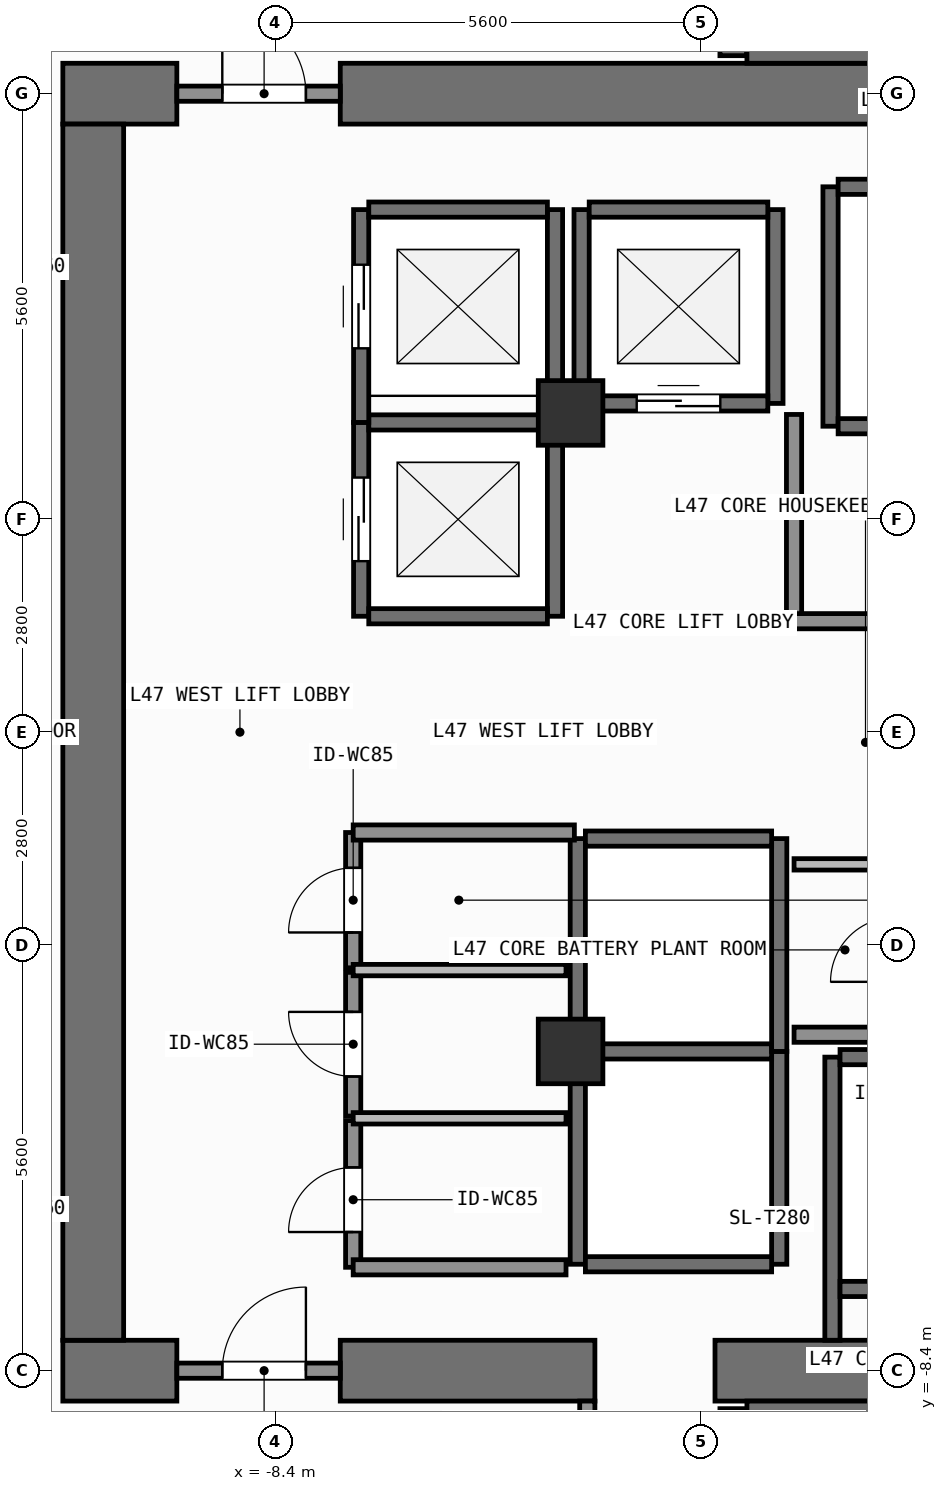
"""IFC4 building model, lengths in metres.
Left out: names, types, materials, properties, quantities, classifications, styles, units other than length and angle.
Written with IfcOpenShell. Run it as: python <this file> out.ifc"""

import sys

from ifc_helpers import new_model, si_unit, direction, frame, frame_2d, origin, origin_2d, place, context, subcontext, project, spatial, rectangle, extrude, element, fill, save


model = new_model("IFC4")
c1 = context("Model", 3, precision=1e-05, world=origin(), true_north=direction((0.0, 1.0)))
c2 = subcontext(c1, "Body", "Model", "MODEL_VIEW")
j1 = project(units=[si_unit("LENGTHUNIT", "METRE"), si_unit("PLANEANGLEUNIT", "RADIAN")], contexts=[c1])
p1 = place(None, origin())
s1 = spatial("IfcSite", under=j1, at=p1, CompositionType="ELEMENT")
p2 = place(p1, origin())
s2 = spatial("IfcBuilding", under=s1, at=p2, CompositionType="ELEMENT")
p3 = place(p2, frame((0.0, 0.0, 191.4)))
s3 = spatial("IfcBuildingStorey", under=s2, at=p3, CompositionType="ELEMENT", Elevation=191.4)
p4 = place(p3, frame((-11.2, -8.4, 0.0), z_axis=(0.0, 0.0, 1.0), x_axis=(1.0, 0.0, 0.0)))
e1 = element("IfcWall", 1, at=p4, inside=s3, PredefinedType="SHEAR", context=c2, shape_type="SweptSolid", body=[
    extrude(rectangle(XDim=1.5, YDim=0.8, at=frame_2d((0.75, 0.0))), origin(), (0.0, 0.0, 1.0), 3.9),
])
p5 = place(p3, frame((-7.55, -8.4, 0.0), z_axis=(0.0, 0.0, 1.0), x_axis=(1.0, 0.0, 0.0)))
e2 = element("IfcWall", 2, at=p5, inside=s3, PredefinedType="SHEAR", context=c2, shape_type="SweptSolid", body=[
    extrude(rectangle(XDim=3.35, YDim=0.8, at=frame_2d((1.675, 0.0))), origin(), (0.0, 0.0, 1.0), 3.9),
])
p6 = place(p3, frame((-2.62, -8.4, 0.0), z_axis=(0.0, 0.0, 1.0), x_axis=(1.0, 0.0, 0.0)))
e3 = element("IfcWall", 3, at=p6, inside=s3, PredefinedType="SHEAR", context=c2, shape_type="SweptSolid", body=[
    extrude(rectangle(XDim=7.27, YDim=0.8, at=frame_2d((3.635, 0.0))), origin(), (0.0, 0.0, 1.0), 3.9),
])
p7 = place(p3, frame((-11.2, 8.4, 0.0), z_axis=(0.0, 0.0, 1.0), x_axis=(1.0, 0.0, 0.0)))
e4 = element("IfcWall", 4, at=p7, inside=s3, PredefinedType="SHEAR", context=c2, shape_type="SweptSolid", body=[
    extrude(rectangle(XDim=1.5, YDim=0.8, at=frame_2d((0.75, 0.0))), origin(), (0.0, 0.0, 1.0), 3.9),
])
p8 = place(p3, frame((-7.55, 8.4, 0.0), z_axis=(0.0, 0.0, 1.0), x_axis=(1.0, 0.0, 0.0)))
e5 = element("IfcWall", 5, at=p8, inside=s3, PredefinedType="SHEAR", context=c2, shape_type="SweptSolid", body=[
    extrude(rectangle(XDim=16.35, YDim=0.8, at=frame_2d((8.175, 0.0))), origin(), (0.0, 0.0, 1.0), 3.9),
])
p9 = place(p3, frame((-10.8, -8.0, 0.0), z_axis=(0.0, 0.0, 1.0), x_axis=(0.0, 1.0, 0.0)))
e6 = element("IfcWall", 6, at=p9, inside=s3, PredefinedType="SHEAR", context=c2, shape_type="SweptSolid", body=[
    extrude(rectangle(XDim=16.0, YDim=0.8, at=frame_2d((8.0, 0.0))), origin(), (0.0, 0.0, 1.0), 3.9),
])
p10 = place(p3, frame((-2.2, -8.913, 0.0), z_axis=(0.0, 0.0, 1.0), x_axis=(1.0, 0.0, 0.0)))
e7 = element("IfcWall", 7, at=p10, inside=s3, PredefinedType="SHEAR", context=c2, shape_type="SweptSolid", body=[
    extrude(rectangle(XDim=6.6, YDim=0.225, at=frame_2d((3.3, 0.0))), origin(), (0.0, 0.0, 1.0), 3.9),
])
p11 = place(p3, frame((-2.38, -11.825, 0.0), z_axis=(0.0, 0.0, 1.0), x_axis=(0.0, 1.0, 0.0)))
e8 = element("IfcWall", 8, at=p11, inside=s3, PredefinedType="SHEAR", context=c2, shape_type="SweptSolid", body=[
    extrude(rectangle(XDim=2.925, YDim=0.35, at=frame_2d((1.462, 0.0))), origin(), (0.0, 0.0, 1.0), 3.9),
])
p12 = place(p3, frame((-2.2, 8.913, 0.0), z_axis=(0.0, 0.0, 1.0), x_axis=(1.0, 0.0, 0.0)))
e9 = element("IfcWall", 9, at=p12, inside=s3, PredefinedType="SHEAR", context=c2, shape_type="SweptSolid", body=[
    extrude(rectangle(XDim=6.6, YDim=0.225, at=frame_2d((3.3, 0.0))), origin(), (0.0, 0.0, 1.0), 3.9),
])
p13 = place(p3, frame((-2.38, 8.9, 0.0), z_axis=(0.0, 0.0, 1.0), x_axis=(0.0, 1.0, 0.0)))
e10 = element("IfcWall", 10, at=p13, inside=s3, PredefinedType="SHEAR", context=c2, shape_type="SweptSolid", body=[
    extrude(rectangle(XDim=2.925, YDim=0.35, at=frame_2d((1.462, 0.0))), origin(), (0.0, 0.0, 1.0), 3.9),
])
for number, where, z_axis, x_axis in (
    (11, (-4.52, -4.2, 0.0), (0.0, 0.0, 1.0), (1.0, 0.0, 0.0)),
    (12, (-4.52, 4.2, 0.0), (0.0, 0.0, 1.0), (1.0, 0.0, 0.0)),
):
    element("IfcColumn", number, at=place(p3, frame(where, z_axis=z_axis, x_axis=x_axis)), inside=s3, PredefinedType="COLUMN", context=c2, shape_type="SweptSolid", body=[
        extrude(rectangle(XDim=0.85, YDim=0.85, at=origin_2d()), origin(), (0.0, 0.0, 1.0), 3.9),
    ])
p14 = place(p3, frame((-7.275, 1.525, 0.0), z_axis=(0.0, 0.0, 1.0), x_axis=(0.0, 1.0, 0.0)))
e13 = element("IfcWall", 13, at=p14, inside=s3, PredefinedType="SHEAR", context=c2, shape_type="SweptSolid", body=[
    extrude(rectangle(XDim=2.55, YDim=0.2, at=frame_2d((1.275, 0.0))), origin(), (0.0, 0.0, 1.0), 3.68),
])
p15 = place(p14, frame((0.725, 0.0, 0.0)))
e14 = element("IfcOpeningElement", 14, at=p15, cuts=e13, PredefinedType="OPENING", context=c2, shape_type="SweptSolid", body=[
    extrude(rectangle(XDim=1.1, YDim=2.2, at=frame_2d((0.55, 1.1))), frame((0.0, 0.11, 0.0), z_axis=(0.0, -1.0, 0.0), x_axis=(1.0, 0.0, 0.0)), (0.0, 0.0, 1.0), 0.22),
])
p16 = place(p3, frame((-4.725, 1.525, 0.0), z_axis=(0.0, 0.0, 1.0), x_axis=(0.0, 1.0, 0.0)))
e15 = element("IfcWall", 15, at=p16, inside=s3, PredefinedType="SHEAR", context=c2, shape_type="SweptSolid", body=[
    extrude(rectangle(XDim=2.55, YDim=0.2, at=frame_2d((1.275, 0.0))), origin(), (0.0, 0.0, 1.0), 3.68),
])
for number, where, z_axis, x_axis in (
    (16, (-7.175, 1.525, 0.0), (0.0, 0.0, 1.0), (1.0, 0.0, 0.0)),
    (17, (-7.175, 4.075, 0.0), (0.0, 0.0, 1.0), (1.0, 0.0, 0.0)),
):
    element("IfcWall", number, at=place(p3, frame(where, z_axis=z_axis, x_axis=x_axis)), inside=s3, PredefinedType="SHEAR", context=c2, shape_type="SweptSolid", body=[
        extrude(rectangle(XDim=2.35, YDim=0.2, at=frame_2d((1.175, 0.0))), origin(), (0.0, 0.0, 1.0), 3.68),
    ])
p17 = place(p3, frame((-7.275, 4.075, 0.0), z_axis=(0.0, 0.0, 1.0), x_axis=(0.0, 1.0, 0.0)))
e18 = element("IfcWall", 18, at=p17, inside=s3, PredefinedType="SHEAR", context=c2, shape_type="SweptSolid", body=[
    extrude(rectangle(XDim=2.8, YDim=0.2, at=frame_2d((1.4, 0.0))), origin(), (0.0, 0.0, 1.0), 3.68),
])
p18 = place(p17, frame((0.975, 0.0, 0.0)))
e19 = element("IfcOpeningElement", 19, at=p18, cuts=e18, PredefinedType="OPENING", context=c2, shape_type="SweptSolid", body=[
    extrude(rectangle(XDim=1.1, YDim=2.2, at=frame_2d((0.55, 1.1))), frame((0.0, 0.11, 0.0), z_axis=(0.0, -1.0, 0.0), x_axis=(1.0, 0.0, 0.0)), (0.0, 0.0, 1.0), 0.22),
])
p19 = place(p3, frame((-4.725, 4.075, 0.0), z_axis=(0.0, 0.0, 1.0), x_axis=(0.0, 1.0, 0.0)))
e20 = element("IfcWall", 20, at=p19, inside=s3, PredefinedType="SHEAR", context=c2, shape_type="SweptSolid", body=[
    extrude(rectangle(XDim=2.8, YDim=0.2, at=frame_2d((1.4, 0.0))), origin(), (0.0, 0.0, 1.0), 3.68),
])
p20 = place(p3, frame((-7.175, 6.875, 0.0), z_axis=(0.0, 0.0, 1.0), x_axis=(1.0, 0.0, 0.0)))
e21 = element("IfcWall", 21, at=p20, inside=s3, PredefinedType="SHEAR", context=c2, shape_type="SweptSolid", body=[
    extrude(rectangle(XDim=2.35, YDim=0.2, at=frame_2d((1.175, 0.0))), origin(), (0.0, 0.0, 1.0), 3.68),
])
for number, where, z_axis, x_axis in (
    (22, (-4.375, 4.325, 0.0), (0.0, 0.0, 1.0), (0.0, 1.0, 0.0)),
    (23, (-1.825, 4.325, 0.0), (0.0, 0.0, 1.0), (0.0, 1.0, 0.0)),
):
    element("IfcWall", number, at=place(p3, frame(where, z_axis=z_axis, x_axis=x_axis)), inside=s3, PredefinedType="SHEAR", context=c2, shape_type="SweptSolid", body=[
        extrude(rectangle(XDim=2.55, YDim=0.2, at=frame_2d((1.275, 0.0))), origin(), (0.0, 0.0, 1.0), 3.68),
    ])
p21 = place(p3, frame((-4.275, 4.325, 0.0), z_axis=(0.0, 0.0, 1.0), x_axis=(1.0, 0.0, 0.0)))
e24 = element("IfcWall", 24, at=p21, inside=s3, PredefinedType="SHEAR", context=c2, shape_type="SweptSolid", body=[
    extrude(rectangle(XDim=2.35, YDim=0.2, at=frame_2d((1.175, 0.0))), origin(), (0.0, 0.0, 1.0), 3.68),
])
p22 = place(p21, frame((0.625, 0.0, 0.0)))
e25 = element("IfcOpeningElement", 25, at=p22, cuts=e24, PredefinedType="OPENING", context=c2, shape_type="SweptSolid", body=[
    extrude(rectangle(XDim=1.1, YDim=2.2, at=frame_2d((0.55, 1.1))), frame((0.0, 0.11, 0.0), z_axis=(0.0, -1.0, 0.0), x_axis=(1.0, 0.0, 0.0)), (0.0, 0.0, 1.0), 0.22),
])
p23 = place(p3, frame((-4.275, 6.875, 0.0), z_axis=(0.0, 0.0, 1.0), x_axis=(1.0, 0.0, 0.0)))
e26 = element("IfcWall", 26, at=p23, inside=s3, PredefinedType="SHEAR", context=c2, shape_type="SweptSolid", body=[
    extrude(rectangle(XDim=2.35, YDim=0.2, at=frame_2d((1.175, 0.0))), origin(), (0.0, 0.0, 1.0), 3.68),
])
for number, where, z_axis, x_axis in (
    (27, (-4.425, -7.0, 0.0), (0.0, 0.0, 1.0), (0.0, 1.0, 0.0)),
    (28, (-1.775, -7.0, 0.0), (0.0, 0.0, 1.0), (0.0, 1.0, 0.0)),
):
    element("IfcWall", number, at=place(p3, frame(where, z_axis=z_axis, x_axis=x_axis)), inside=s3, PredefinedType="SHEAR", context=c2, shape_type="SweptSolid", body=[
        extrude(rectangle(XDim=2.8, YDim=0.2, at=frame_2d((1.4, 0.0))), origin(), (0.0, 0.0, 1.0), 3.68),
    ])
for number, where, z_axis, x_axis in (
    (29, (-4.325, -7.0, 0.0), (0.0, 0.0, 1.0), (1.0, 0.0, 0.0)),
    (30, (-4.325, -4.2, 0.0), (0.0, 0.0, 1.0), (1.0, 0.0, 0.0)),
):
    element("IfcWall", number, at=place(p3, frame(where, z_axis=z_axis, x_axis=x_axis)), inside=s3, PredefinedType="SHEAR", context=c2, shape_type="SweptSolid", body=[
        extrude(rectangle(XDim=2.45, YDim=0.2, at=frame_2d((1.225, 0.0))), origin(), (0.0, 0.0, 1.0), 3.68),
    ])
for number, where, z_axis, x_axis in (
    (31, (-4.425, -4.2, 0.0), (0.0, 0.0, 1.0), (0.0, 1.0, 0.0)),
    (32, (-1.775, -4.2, 0.0), (0.0, 0.0, 1.0), (0.0, 1.0, 0.0)),
):
    element("IfcWall", number, at=place(p3, frame(where, z_axis=z_axis, x_axis=x_axis)), inside=s3, PredefinedType="SHEAR", context=c2, shape_type="SweptSolid", body=[
        extrude(rectangle(XDim=2.8, YDim=0.2, at=frame_2d((1.4, 0.0))), origin(), (0.0, 0.0, 1.0), 3.68),
    ])
p24 = place(p3, frame((-4.325, -1.4, 0.0), z_axis=(0.0, 0.0, 1.0), x_axis=(1.0, 0.0, 0.0)))
e33 = element("IfcWall", 33, at=p24, inside=s3, PredefinedType="SHEAR", context=c2, shape_type="SweptSolid", body=[
    extrude(rectangle(XDim=2.45, YDim=0.2, at=frame_2d((1.225, 0.0))), origin(), (0.0, 0.0, 1.0), 3.68),
])
p25 = place(p3, frame((-1.1, 4.025, 0.0), z_axis=(0.0, 0.0, 1.0), x_axis=(0.0, 1.0, 0.0)))
e34 = element("IfcWall", 34, at=p25, inside=s3, PredefinedType="SHEAR", context=c2, shape_type="SweptSolid", body=[
    extrude(rectangle(XDim=3.15, YDim=0.2, at=frame_2d((1.575, 0.0))), origin(), (0.0, 0.0, 1.0), 3.68),
])
for number, where, z_axis, x_axis in (
    (35, (-1.0, 4.025, 0.0), (0.0, 0.0, 1.0), (1.0, 0.0, 0.0)),
    (36, (-1.0, 7.175, 0.0), (0.0, 0.0, 1.0), (1.0, 0.0, 0.0)),
):
    element("IfcWall", number, at=place(p3, frame(where, z_axis=z_axis, x_axis=x_axis)), inside=s3, PredefinedType="SHEAR", context=c2, shape_type="SweptSolid", body=[
        extrude(rectangle(XDim=2.4, YDim=0.2, at=frame_2d((1.2, 0.0))), origin(), (0.0, 0.0, 1.0), 3.68),
    ])
p26 = place(p3, frame((-1.075, -8.0, 0.0), z_axis=(0.0, 0.0, 1.0), x_axis=(0.0, 1.0, 0.0)))
e37 = element("IfcWall", 37, at=p26, inside=s3, PredefinedType="SHEAR", context=c2, shape_type="SweptSolid", body=[
    extrude(rectangle(XDim=3.725, YDim=0.2, at=frame_2d((1.863, 0.0))), origin(), (0.0, 0.0, 1.0), 3.68),
])
for number, where, z_axis, x_axis in (
    (38, (-0.975, -7.325, 0.0), (0.0, 0.0, 1.0), (1.0, 0.0, 0.0)),
    (39, (-0.975, -4.275, 0.0), (0.0, 0.0, 1.0), (1.0, 0.0, 0.0)),
):
    element("IfcWall", number, at=place(p3, frame(where, z_axis=z_axis, x_axis=x_axis)), inside=s3, PredefinedType="SHEAR", context=c2, shape_type="SweptSolid", body=[
        extrude(rectangle(XDim=2.35, YDim=0.2, at=frame_2d((1.175, 0.0))), origin(), (0.0, 0.0, 1.0), 3.68),
    ])
p27 = place(p3, frame((-9.7, -8.4, 0.0), z_axis=(0.0, 0.0, 1.0), x_axis=(1.0, 0.0, 0.0)))
e40 = element("IfcWall", 40, at=p27, inside=s3, PredefinedType="SOLIDWALL", context=c2, shape_type="SweptSolid", body=[
    extrude(rectangle(XDim=2.15, YDim=0.2, at=frame_2d((1.075, 0.0))), origin(), (0.0, 0.0, 1.0), 2.82),
])
p28 = place(p27, frame((0.598, 0.0, 0.0)))
e41 = element("IfcOpeningElement", 41, at=p28, cuts=e40, PredefinedType="OPENING", context=c2, shape_type="SweptSolid", body=[
    extrude(rectangle(XDim=1.1, YDim=2.15, at=frame_2d((0.55, 1.075))), frame((0.0, 0.11, 0.0), z_axis=(0.0, -1.0, 0.0), x_axis=(1.0, 0.0, 0.0)), (0.0, 0.0, 1.0), 0.22),
])
p29 = place(p3, frame((-9.7, 8.4, 0.0), z_axis=(0.0, 0.0, 1.0), x_axis=(1.0, 0.0, 0.0)))
e42 = element("IfcWall", 42, at=p29, inside=s3, PredefinedType="SOLIDWALL", context=c2, shape_type="SweptSolid", body=[
    extrude(rectangle(XDim=2.15, YDim=0.2, at=frame_2d((1.075, 0.0))), origin(), (0.0, 0.0, 1.0), 2.82),
])
p30 = place(p29, frame((0.598, 0.0, 0.0)))
e43 = element("IfcOpeningElement", 43, at=p30, cuts=e42, PredefinedType="OPENING", context=c2, shape_type="SweptSolid", body=[
    extrude(rectangle(XDim=1.1, YDim=2.15, at=frame_2d((0.55, 1.075))), frame((0.0, 0.11, 0.0), z_axis=(0.0, -1.0, 0.0), x_axis=(1.0, 0.0, 0.0)), (0.0, 0.0, 1.0), 0.22),
])
p31 = place(p3, frame((-7.38, -7.04, 0.0), z_axis=(0.0, 0.0, 1.0), x_axis=(0.0, 1.0, 0.0)))
e44 = element("IfcWall", 44, at=p31, inside=s3, PredefinedType="SOLIDWALL", context=c2, shape_type="SweptSolid", body=[
    extrude(rectangle(XDim=1.93, YDim=0.2, at=frame_2d((0.965, 0.0))), origin(), (0.0, 0.0, 1.0), 3.68),
])
p32 = place(p31, frame((0.464, 0.0, 0.0)))
e45 = element("IfcOpeningElement", 45, at=p32, cuts=e44, PredefinedType="OPENING", context=c2, shape_type="SweptSolid", body=[
    extrude(rectangle(XDim=0.85, YDim=2.1, at=frame_2d((0.425, 1.05))), frame((0.0, 0.11, 0.0), z_axis=(0.0, -1.0, 0.0), x_axis=(1.0, 0.0, 0.0)), (0.0, 0.0, 1.0), 0.22),
])
p33 = place(p3, frame((-7.38, -5.05, 0.0), z_axis=(0.0, 0.0, 1.0), x_axis=(0.0, 1.0, 0.0)))
e46 = element("IfcWall", 46, at=p33, inside=s3, PredefinedType="SOLIDWALL", context=c2, shape_type="SweptSolid", body=[
    extrude(rectangle(XDim=1.89, YDim=0.2, at=frame_2d((0.945, 0.0))), origin(), (0.0, 0.0, 1.0), 3.68),
])
p34 = place(p33, frame((0.52, 0.0, 0.0)))
e47 = element("IfcOpeningElement", 47, at=p34, cuts=e46, PredefinedType="OPENING", context=c2, shape_type="SweptSolid", body=[
    extrude(rectangle(XDim=0.85, YDim=2.1, at=frame_2d((0.425, 1.05))), frame((0.0, 0.11, 0.0), z_axis=(0.0, -1.0, 0.0), x_axis=(1.0, 0.0, 0.0)), (0.0, 0.0, 1.0), 0.22),
])
p35 = place(p3, frame((-7.38, -3.1, 0.0), z_axis=(0.0, 0.0, 1.0), x_axis=(0.0, 1.0, 0.0)))
e48 = element("IfcWall", 48, at=p35, inside=s3, PredefinedType="SOLIDWALL", context=c2, shape_type="SweptSolid", body=[
    extrude(rectangle(XDim=1.78, YDim=0.2, at=frame_2d((0.89, 0.0))), origin(), (0.0, 0.0, 1.0), 3.68),
])
p36 = place(p35, frame((0.465, 0.0, 0.0)))
e49 = element("IfcOpeningElement", 49, at=p36, cuts=e48, PredefinedType="OPENING", context=c2, shape_type="SweptSolid", body=[
    extrude(rectangle(XDim=0.85, YDim=2.1, at=frame_2d((0.425, 1.05))), frame((0.0, 0.11, 0.0), z_axis=(0.0, -1.0, 0.0), x_axis=(1.0, 0.0, 0.0)), (0.0, 0.0, 1.0), 0.22),
])
p37 = place(p3, frame((-4.3, -12.06, 0.0), z_axis=(0.0, 0.0, 1.0), x_axis=(0.0, 1.0, 0.0)))
e50 = element("IfcWall", 50, at=p37, inside=s3, PredefinedType="SOLIDWALL", context=c2, shape_type="SweptSolid", body=[
    extrude(rectangle(XDim=3.26, YDim=0.2, at=frame_2d((1.63, 0.0))), origin(), (0.0, 0.0, 1.0), 3.68),
])
p38 = place(p3, frame((-7.38, -1.32, 0.0), z_axis=(0.0, 0.0, 1.0), x_axis=(1.0, 0.0, 0.0)))
e51 = element("IfcWall", 51, at=p38, inside=s3, PredefinedType="SOLIDWALL", context=c2, shape_type="SweptSolid", body=[
    extrude(rectangle(XDim=2.91, YDim=0.2, at=frame_2d((1.455, 0.0))), origin(), (0.0, 0.0, 1.0), 3.68),
])
p39 = place(p3, frame((-1.58, 1.48, 0.0), z_axis=(0.0, 0.0, 1.0), x_axis=(0.0, 1.0, 0.0)))
e52 = element("IfcWall", 52, at=p39, inside=s3, PredefinedType="SOLIDWALL", context=c2, shape_type="SweptSolid", body=[
    extrude(rectangle(XDim=2.7, YDim=0.2, at=frame_2d((1.35, 0.0))), origin(), (0.0, 0.0, 1.0), 3.68),
])
for number, where, z_axis, x_axis in (
    (53, (-1.58, -3.98, 0.0), (0.0, 0.0, 1.0), (1.0, 0.0, 0.0)),
    (54, (-1.58, 1.46, 0.0), (0.0, 0.0, 1.0), (1.0, 0.0, 0.0)),
):
    element("IfcWall", number, at=place(p3, frame(where, z_axis=z_axis, x_axis=x_axis)), inside=s3, PredefinedType="SOLIDWALL", context=c2, shape_type="SweptSolid", body=[
        extrude(rectangle(XDim=3.19, YDim=0.2, at=frame_2d((1.595, 0.0))), origin(), (0.0, 0.0, 1.0), 3.68),
    ])
p40 = place(p3, frame((-1.58, -1.739, 0.0), z_axis=(0.0, 0.0, 1.0), x_axis=(1.0, 0.0, 0.0)))
e55 = element("IfcWall", 55, at=p40, inside=s3, PredefinedType="PARTITIONING", context=c2, shape_type="SweptSolid", body=[
    extrude(rectangle(XDim=3.19, YDim=0.15, at=frame_2d((1.595, 0.0))), origin(), (0.0, 0.0, 1.0), 3.68),
])
p41 = place(p3, frame((-7.38, -7.04, 0.0), z_axis=(0.0, 0.0, 1.0), x_axis=(1.0, 0.0, 0.0)))
e56 = element("IfcWall", 56, at=p41, inside=s3, PredefinedType="SOLIDWALL", context=c2, shape_type="SweptSolid", body=[
    extrude(rectangle(XDim=2.8, YDim=0.2, at=frame_2d((1.4, 0.0))), origin(), (0.0, 0.0, 1.0), 3.68),
])
for number, where, z_axis, x_axis in (
    (57, (-7.38, -5.08, 0.0), (0.0, 0.0, 1.0), (1.0, 0.0, 0.0)),
    (58, (-7.38, -3.13, 0.0), (0.0, 0.0, 1.0), (1.0, 0.0, 0.0)),
):
    element("IfcWall", number, at=place(p3, frame(where, z_axis=z_axis, x_axis=x_axis)), inside=s3, PredefinedType="PARTITIONING", context=c2, shape_type="SweptSolid", body=[
        extrude(rectangle(XDim=2.8, YDim=0.15, at=frame_2d((1.4, 0.0))), origin(), (0.0, 0.0, 1.0), 3.68),
    ])
p42 = place(p15, origin())
e59 = element("IfcDoor", 59, at=p42, inside=s3, OperationType="SLIDING_TO_LEFT", PredefinedType="DOOR", context=c2, shape_type="SweptSolid", body=[
    extrude(rectangle(XDim=1.1, YDim=2.2, at=frame_2d((0.55, 1.1))), frame((0.0, 0.025, 0.0), z_axis=(0.0, -1.0, 0.0), x_axis=(1.0, 0.0, 0.0)), (0.0, 0.0, 1.0), 0.05),
])
fill(e14, e59)
p43 = place(p18, origin())
e60 = element("IfcDoor", 60, at=p43, inside=s3, OperationType="SLIDING_TO_LEFT", PredefinedType="DOOR", context=c2, shape_type="SweptSolid", body=[
    extrude(rectangle(XDim=1.1, YDim=2.2, at=frame_2d((0.55, 1.1))), frame((0.0, 0.025, 0.0), z_axis=(0.0, -1.0, 0.0), x_axis=(1.0, 0.0, 0.0)), (0.0, 0.0, 1.0), 0.05),
])
fill(e19, e60)
p44 = place(p22, origin())
e61 = element("IfcDoor", 61, at=p44, inside=s3, OperationType="SLIDING_TO_LEFT", PredefinedType="DOOR", context=c2, shape_type="SweptSolid", body=[
    extrude(rectangle(XDim=1.1, YDim=2.2, at=frame_2d((0.55, 1.1))), frame((0.0, 0.025, 0.0), z_axis=(0.0, -1.0, 0.0), x_axis=(1.0, 0.0, 0.0)), (0.0, 0.0, 1.0), 0.05),
])
fill(e25, e61)
p45 = place(p28, origin())
e62 = element("IfcDoor", 62, at=p45, inside=s3, OperationType="SINGLE_SWING_RIGHT", PredefinedType="DOOR", context=c2, shape_type="SweptSolid", body=[
    extrude(rectangle(XDim=1.1, YDim=2.15, at=frame_2d((0.55, 1.075))), frame((0.0, 0.025, 0.0), z_axis=(0.0, -1.0, 0.0), x_axis=(1.0, 0.0, 0.0)), (0.0, 0.0, 1.0), 0.05),
])
fill(e41, e62)
p46 = place(p30, origin())
e63 = element("IfcDoor", 63, at=p46, inside=s3, OperationType="SINGLE_SWING_LEFT", PredefinedType="DOOR", context=c2, shape_type="SweptSolid", body=[
    extrude(rectangle(XDim=1.1, YDim=2.15, at=frame_2d((0.55, 1.075))), frame((0.0, 0.025, 0.0), z_axis=(0.0, -1.0, 0.0), x_axis=(1.0, 0.0, 0.0)), (0.0, 0.0, 1.0), 0.05),
])
fill(e43, e63)
p47 = place(p32, origin())
e64 = element("IfcDoor", 64, at=p47, inside=s3, OperationType="SINGLE_SWING_LEFT", PredefinedType="DOOR", context=c2, shape_type="SweptSolid", body=[
    extrude(rectangle(XDim=0.85, YDim=2.1, at=frame_2d((0.425, 1.05))), frame((0.0, 0.025, 0.0), z_axis=(0.0, -1.0, 0.0), x_axis=(1.0, 0.0, 0.0)), (0.0, 0.0, 1.0), 0.05),
])
fill(e45, e64)
p48 = place(p34, origin())
e65 = element("IfcDoor", 65, at=p48, inside=s3, OperationType="SINGLE_SWING_RIGHT", PredefinedType="DOOR", context=c2, shape_type="SweptSolid", body=[
    extrude(rectangle(XDim=0.85, YDim=2.1, at=frame_2d((0.425, 1.05))), frame((0.0, 0.025, 0.0), z_axis=(0.0, -1.0, 0.0), x_axis=(1.0, 0.0, 0.0)), (0.0, 0.0, 1.0), 0.05),
])
fill(e47, e65)
p49 = place(p36, origin())
e66 = element("IfcDoor", 66, at=p49, inside=s3, OperationType="SINGLE_SWING_LEFT", PredefinedType="DOOR", context=c2, shape_type="SweptSolid", body=[
    extrude(rectangle(XDim=0.85, YDim=2.1, at=frame_2d((0.425, 1.05))), frame((0.0, 0.025, 0.0), z_axis=(0.0, -1.0, 0.0), x_axis=(1.0, 0.0, 0.0)), (0.0, 0.0, 1.0), 0.05),
])
fill(e49, e66)
save(model, sys.argv[1])
